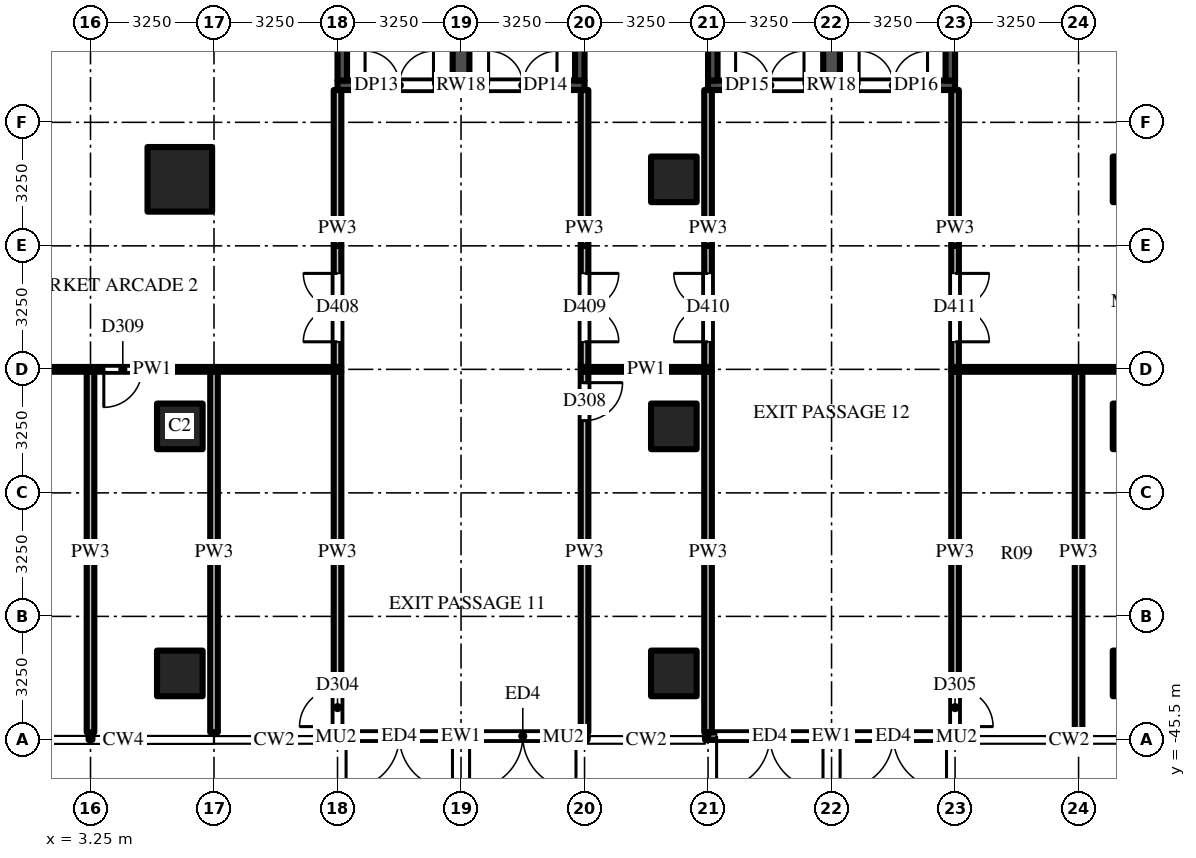
"""IFC4 building model, lengths in metres.
Left out: names, types, materials, properties, quantities, classifications, styles, units other than length and angle.
Written with IfcOpenShell. Run it as: python <this file> out.ifc"""

import sys

from ifc_helpers import new_model, si_unit, direction, frame, frame_2d, origin, origin_2d, place, context, subcontext, project, spatial, rectangle, extrude, source, transform, mapped, element, fill, save


model = new_model("IFC4")
c1 = context("Model", 3, precision=1e-05, world=origin(), true_north=direction((0.0, 1.0)))
c2 = subcontext(c1, "Body", "Model", "MODEL_VIEW")
j1 = project(units=[si_unit("LENGTHUNIT", "METRE"), si_unit("PLANEANGLEUNIT", "RADIAN")], contexts=[c1])
p1 = place(None, origin())
s1 = spatial("IfcSite", under=j1, at=p1, CompositionType="ELEMENT")
p2 = place(p1, origin())
s2 = spatial("IfcBuilding", under=s1, at=p2, CompositionType="ELEMENT")
p3 = place(p2, origin())
s3 = spatial("IfcBuildingStorey", under=s2, at=p3, CompositionType="ELEMENT", Elevation=0.0)
m1 = source(origin(), c2, "Body", "SweptSolid", [
    extrude(rectangle(XDim=1.7, YDim=1.7, at=origin_2d()), origin(), (0.0, 0.0, 1.0), 8.5),
])
p4 = place(p3, frame((5.6, -30.75, -0.5), z_axis=(0.0, 0.0, 1.0), x_axis=(1.0, 0.0, 0.0)))
e1 = element("IfcColumn", 1, at=p4, inside=s3, PredefinedType="COLUMN", context=c2, shape_type="MappedRepresentation", body=[
    mapped(m1, transform((0.0, 0.0, 0.0))),
])
m2 = source(origin(), c2, "Body", "SweptSolid", [
    extrude(rectangle(XDim=1.2, YDim=1.2, at=origin_2d()), origin(), (0.0, 0.0, 1.0), 8.5),
])
for number, where, z_axis, x_axis in (
    (2, (5.6, -37.25, -0.5), (0.0, 0.0, 1.0), (1.0, 0.0, 0.0)),
    (3, (5.6, -43.75, -0.5), (0.0, 0.0, 1.0), (1.0, 0.0, 0.0)),
    (4, (18.6, -30.75, -0.5), (0.0, 0.0, 1.0), (1.0, 0.0, 0.0)),
    (5, (18.6, -37.25, -0.5), (0.0, 0.0, 1.0), (1.0, 0.0, 0.0)),
    (6, (18.6, -43.75, -0.5), (0.0, 0.0, 1.0), (1.0, 0.0, 0.0)),
    (7, (30.75, -30.75, -0.5), (0.0, 0.0, 1.0), (1.0, 0.0, 0.0)),
    (8, (30.75, -37.25, -0.5), (0.0, 0.0, 1.0), (1.0, 0.0, 0.0)),
    (9, (30.75, -43.75, -0.5), (0.0, 0.0, 1.0), (1.0, 0.0, 0.0)),
):
    element("IfcColumn", number, at=place(p3, frame(where, z_axis=z_axis, x_axis=x_axis)), inside=s3, PredefinedType="COLUMN", context=c2, shape_type="MappedRepresentation", body=[
        mapped(m2, transform((0.0, 0.0, 0.0))),
    ])
m3 = source(origin(), c2, "Body", "SweptSolid", [
    extrude(rectangle(XDim=6.5, YDim=0.25, at=frame_2d((3.25, 0.0))), origin(), (0.0, 0.0, 1.0), 7.7),
])
p5 = place(p3, frame((9.75, -28.275, 0.0), z_axis=(0.0, 0.0, 1.0), x_axis=(1.0, 0.0, 0.0)))
e10 = element("IfcWall", 10, at=p5, inside=s3, PredefinedType="SHEAR", context=c2, shape_type="MappedRepresentation", body=[
    mapped(m3, transform((0.0, 0.0, 0.0))),
])
m4 = source(origin(), c2, "Body", "SweptSolid", [
    extrude(rectangle(XDim=1.8, YDim=2.1, at=frame_2d((0.9, 1.05))), frame((0.0, 0.135, 0.0), z_axis=(0.0, -1.0, 0.0), x_axis=(1.0, 0.0, 0.0)), (0.0, 0.0, 1.0), 0.27),
])
p6 = place(p5, frame((0.725, 0.0, 0.0)))
e11 = element("IfcOpeningElement", 11, at=p6, cuts=e10, PredefinedType="OPENING", context=c2, shape_type="MappedRepresentation", body=[
    mapped(m4, transform((0.0, 0.0, 0.0))),
])
p7 = place(p5, frame((3.975, 0.0, 0.0)))
e12 = element("IfcOpeningElement", 12, at=p7, cuts=e10, PredefinedType="OPENING", context=c2, shape_type="MappedRepresentation", body=[
    mapped(m4, transform((0.0, 0.0, 0.0))),
])
m5 = source(origin(), c2, "Body", "SweptSolid", [
    extrude(rectangle(XDim=8.3, YDim=0.25, at=frame_2d((4.15, 0.0))), origin(), (0.0, 0.0, 1.0), 7.7),
])
for number, where, z_axis, x_axis in (
    (13, (9.875, -28.15, 0.0), (0.0, 0.0, 1.0), (0.0, 1.0, 0.0)),
    (14, (16.125, -28.15, 0.0), (0.0, 0.0, 1.0), (0.0, 1.0, 0.0)),
):
    element("IfcWall", number, at=place(p3, frame(where, z_axis=z_axis, x_axis=x_axis)), inside=s3, PredefinedType="SHEAR", context=c2, shape_type="MappedRepresentation", body=[
        mapped(m5, transform((0.0, 0.0, 0.0))),
    ])
m6 = source(origin(), c2, "Body", "SweptSolid", [
    extrude(rectangle(XDim=8.3, YDim=0.44, at=frame_2d((4.15, 0.0))), origin(), (0.0, 0.0, 1.0), 7.7),
])
p8 = place(p3, frame((13.0, -28.15, 0.0), z_axis=(0.0, 0.0, 1.0), x_axis=(0.0, 1.0, 0.0)))
e15 = element("IfcWall", 15, at=p8, inside=s3, PredefinedType="SHEAR", context=c2, shape_type="MappedRepresentation", body=[
    mapped(m6, transform((0.0, 0.0, 0.0))),
])
p9 = place(p3, frame((19.5, -28.275, 0.0), z_axis=(0.0, 0.0, 1.0), x_axis=(1.0, 0.0, 0.0)))
e16 = element("IfcWall", 16, at=p9, inside=s3, PredefinedType="SHEAR", context=c2, shape_type="MappedRepresentation", body=[
    mapped(m3, transform((0.0, 0.0, 0.0))),
])
p10 = place(p9, frame((0.725, 0.0, 0.0)))
e17 = element("IfcOpeningElement", 17, at=p10, cuts=e16, PredefinedType="OPENING", context=c2, shape_type="MappedRepresentation", body=[
    mapped(m4, transform((0.0, 0.0, 0.0))),
])
p11 = place(p9, frame((3.975, 0.0, 0.0)))
e18 = element("IfcOpeningElement", 18, at=p11, cuts=e16, PredefinedType="OPENING", context=c2, shape_type="MappedRepresentation", body=[
    mapped(m4, transform((0.0, 0.0, 0.0))),
])
for number, where, z_axis, x_axis in (
    (19, (19.625, -28.15, 0.0), (0.0, 0.0, 1.0), (0.0, 1.0, 0.0)),
    (20, (25.875, -28.15, 0.0), (0.0, 0.0, 1.0), (0.0, 1.0, 0.0)),
):
    element("IfcWall", number, at=place(p3, frame(where, z_axis=z_axis, x_axis=x_axis)), inside=s3, PredefinedType="SHEAR", context=c2, shape_type="MappedRepresentation", body=[
        mapped(m5, transform((0.0, 0.0, 0.0))),
    ])
p12 = place(p3, frame((22.75, -28.15, 0.0), z_axis=(0.0, 0.0, 1.0), x_axis=(0.0, 1.0, 0.0)))
e21 = element("IfcWall", 21, at=p12, inside=s3, PredefinedType="SHEAR", context=c2, shape_type="MappedRepresentation", body=[
    mapped(m6, transform((0.0, 0.0, 0.0))),
])
m7 = source(origin(), c2, "Body", "SweptSolid", [
    extrude(rectangle(XDim=3.25, YDim=0.2, at=frame_2d((1.625, 0.0))), origin(), (0.0, 0.0, 1.0), 7.7),
])
p13 = place(p3, frame((13.0, -45.4, 0.0), z_axis=(0.0, 0.0, 1.0), x_axis=(-1.0, 0.0, 0.0)))
e22 = element("IfcWall", 22, at=p13, inside=s3, PredefinedType="SOLIDWALL", context=c2, shape_type="MappedRepresentation", body=[
    mapped(m7, transform((0.0, 0.0, 0.0))),
])
m8 = source(origin(), c2, "Body", "SweptSolid", [
    extrude(rectangle(XDim=2.8, YDim=2.4, at=frame_2d((1.4, 1.2))), frame((0.0, 0.11, 0.0), z_axis=(0.0, -1.0, 0.0), x_axis=(1.0, 0.0, 0.0)), (0.0, 0.0, 1.0), 0.22),
])
p14 = place(p13, frame((0.225, 0.0, 0.0)))
e23 = element("IfcOpeningElement", 23, at=p14, cuts=e22, PredefinedType="OPENING", context=c2, shape_type="MappedRepresentation", body=[
    mapped(m8, transform((0.0, 0.0, 0.0))),
])
p15 = place(p3, frame((16.25, -45.4, 0.0), z_axis=(0.0, 0.0, 1.0), x_axis=(-1.0, 0.0, 0.0)))
e24 = element("IfcWall", 24, at=p15, inside=s3, PredefinedType="SOLIDWALL", context=c2, shape_type="MappedRepresentation", body=[
    mapped(m7, transform((0.0, 0.0, 0.0))),
])
p16 = place(p15, frame((0.225, 0.0, 0.0)))
e25 = element("IfcOpeningElement", 25, at=p16, cuts=e24, PredefinedType="OPENING", context=c2, shape_type="MappedRepresentation", body=[
    mapped(m8, transform((0.0, 0.0, 0.0))),
])
p17 = place(p3, frame((22.75, -45.4, 0.0), z_axis=(0.0, 0.0, 1.0), x_axis=(-1.0, 0.0, 0.0)))
e26 = element("IfcWall", 26, at=p17, inside=s3, PredefinedType="SOLIDWALL", context=c2, shape_type="MappedRepresentation", body=[
    mapped(m7, transform((0.0, 0.0, 0.0))),
])
p18 = place(p17, frame((0.225, 0.0, 0.0)))
e27 = element("IfcOpeningElement", 27, at=p18, cuts=e26, PredefinedType="OPENING", context=c2, shape_type="MappedRepresentation", body=[
    mapped(m8, transform((0.0, 0.0, 0.0))),
])
p19 = place(p3, frame((26.0, -45.4, 0.0), z_axis=(0.0, 0.0, 1.0), x_axis=(-1.0, 0.0, 0.0)))
e28 = element("IfcWall", 28, at=p19, inside=s3, PredefinedType="SOLIDWALL", context=c2, shape_type="MappedRepresentation", body=[
    mapped(m7, transform((0.0, 0.0, 0.0))),
])
p20 = place(p19, frame((0.225, 0.0, 0.0)))
e29 = element("IfcOpeningElement", 29, at=p20, cuts=e28, PredefinedType="OPENING", context=c2, shape_type="MappedRepresentation", body=[
    mapped(m8, transform((0.0, 0.0, 0.0))),
])
m9 = source(origin(), c2, "Body", "SweptSolid", [
    extrude(rectangle(XDim=9.488, YDim=0.2, at=frame_2d((4.744, 0.0))), origin(), (0.0, 0.0, 1.0), 6.918),
])
p21 = place(p3, frame((3.25, -45.3, 0.0), z_axis=(0.0, 0.0, 1.0), x_axis=(0.0, 1.0, 0.0)))
e30 = element("IfcWall", 30, at=p21, inside=s3, PredefinedType="PARTITIONING", context=c2, shape_type="MappedRepresentation", body=[
    mapped(m9, transform((0.0, 0.0, 0.0))),
])
m10 = source(origin(), c2, "Body", "SweptSolid", [
    extrude(rectangle(XDim=9.488, YDim=0.2, at=frame_2d((4.744, 0.0))), origin(), (0.0, 0.0, 1.0), 6.762),
])
p22 = place(p3, frame((6.5, -45.3, 0.0), z_axis=(0.0, 0.0, 1.0), x_axis=(0.0, 1.0, 0.0)))
e31 = element("IfcWall", 31, at=p22, inside=s3, PredefinedType="PARTITIONING", context=c2, shape_type="MappedRepresentation", body=[
    mapped(m10, transform((0.0, 0.0, 0.0))),
])
m11 = source(origin(), c2, "Body", "SweptSolid", [
    extrude(rectangle(XDim=3.188, YDim=0.2, at=frame_2d((1.594, 0.0))), origin(), (0.0, 0.0, 1.0), 6.997),
])
p23 = place(p3, frame((9.75, -35.688, 0.0), z_axis=(0.0, 0.0, 1.0), x_axis=(0.0, 1.0, 0.0)))
e32 = element("IfcWall", 32, at=p23, inside=s3, PredefinedType="PARTITIONING", context=c2, shape_type="MappedRepresentation", body=[
    mapped(m11, transform((0.0, 0.0, 0.0))),
])
m12 = source(origin(), c2, "Body", "SweptSolid", [
    extrude(rectangle(XDim=1.8, YDim=2.1, at=frame_2d((0.9, 1.05))), frame((0.0, 0.11, 0.0), z_axis=(0.0, -1.0, 0.0), x_axis=(1.0, 0.0, 0.0)), (0.0, 0.0, 1.0), 0.22),
])
p24 = place(p23, frame((0.663, 0.0, 0.0)))
e33 = element("IfcOpeningElement", 33, at=p24, cuts=e32, PredefinedType="OPENING", context=c2, shape_type="MappedRepresentation", body=[
    mapped(m12, transform((0.0, 0.0, 0.0))),
])
p25 = place(p3, frame((9.75, -45.3, 0.0), z_axis=(0.0, 0.0, 1.0), x_axis=(0.0, 1.0, 0.0)))
e34 = element("IfcWall", 34, at=p25, inside=s3, PredefinedType="PARTITIONING", context=c2, shape_type="MappedRepresentation", body=[
    mapped(m10, transform((0.0, 0.0, 0.0))),
])
m13 = source(origin(), c2, "Body", "SweptSolid", [
    extrude(rectangle(XDim=1.0, YDim=2.1, at=frame_2d((0.5, 1.05))), frame((0.0, 0.11, 0.0), z_axis=(0.0, -1.0, 0.0), x_axis=(1.0, 0.0, 0.0)), (0.0, 0.0, 1.0), 0.22),
])
p26 = place(p25, frame((0.15, 0.0, 0.0)))
e35 = element("IfcOpeningElement", 35, at=p26, cuts=e34, PredefinedType="OPENING", context=c2, shape_type="MappedRepresentation", body=[
    mapped(m13, transform((0.0, 0.0, 0.0))),
])
m14 = source(origin(), c2, "Body", "SweptSolid", [
    extrude(rectangle(XDim=4.1, YDim=0.2, at=frame_2d((2.05, 0.0))), origin(), (0.0, 0.0, 1.0), 6.762),
])
p27 = place(p3, frame((9.75, -32.5, 0.0), z_axis=(0.0, 0.0, 1.0), x_axis=(0.0, 1.0, 0.0)))
e36 = element("IfcWall", 36, at=p27, inside=s3, PredefinedType="PARTITIONING", context=c2, shape_type="MappedRepresentation", body=[
    mapped(m14, transform((0.0, 0.0, 0.0))),
])
p28 = place(p3, frame((16.25, -32.5, 0.0), z_axis=(0.0, 0.0, 1.0), x_axis=(0.0, -1.0, 0.0)))
e37 = element("IfcWall", 37, at=p28, inside=s3, PredefinedType="PARTITIONING", context=c2, shape_type="MappedRepresentation", body=[
    mapped(m11, transform((0.0, 0.0, 0.0))),
])
p29 = place(p28, frame((0.725, 0.0, 0.0)))
e38 = element("IfcOpeningElement", 38, at=p29, cuts=e37, PredefinedType="OPENING", context=c2, shape_type="MappedRepresentation", body=[
    mapped(m12, transform((0.0, 0.0, 0.0))),
])
p30 = place(p3, frame((16.25, -35.812, 0.0), z_axis=(0.0, 0.0, 1.0), x_axis=(0.0, -1.0, 0.0)))
e39 = element("IfcWall", 39, at=p30, inside=s3, PredefinedType="PARTITIONING", context=c2, shape_type="MappedRepresentation", body=[
    mapped(m10, transform((0.0, 0.0, 0.0))),
])
p31 = place(p30, frame((0.288, 0.0, 0.0)))
e40 = element("IfcOpeningElement", 40, at=p31, cuts=e39, PredefinedType="OPENING", context=c2, shape_type="MappedRepresentation", body=[
    mapped(m13, transform((0.0, 0.0, 0.0))),
])
p32 = place(p3, frame((16.25, -32.5, 0.0), z_axis=(0.0, 0.0, 1.0), x_axis=(0.0, 1.0, 0.0)))
e41 = element("IfcWall", 41, at=p32, inside=s3, PredefinedType="PARTITIONING", context=c2, shape_type="MappedRepresentation", body=[
    mapped(m14, transform((0.0, 0.0, 0.0))),
])
p33 = place(p3, frame((19.5, -35.688, 0.0), z_axis=(0.0, 0.0, 1.0), x_axis=(0.0, 1.0, 0.0)))
e42 = element("IfcWall", 42, at=p33, inside=s3, PredefinedType="PARTITIONING", context=c2, shape_type="MappedRepresentation", body=[
    mapped(m11, transform((0.0, 0.0, 0.0))),
])
p34 = place(p33, frame((0.663, 0.0, 0.0)))
e43 = element("IfcOpeningElement", 43, at=p34, cuts=e42, PredefinedType="OPENING", context=c2, shape_type="MappedRepresentation", body=[
    mapped(m12, transform((0.0, 0.0, 0.0))),
])
m15 = source(origin(), c2, "Body", "SweptSolid", [
    extrude(rectangle(XDim=9.488, YDim=0.2, at=frame_2d((4.744, 0.0))), origin(), (0.0, 0.0, 1.0), 6.839),
])
p35 = place(p3, frame((19.5, -45.3, 0.0), z_axis=(0.0, 0.0, 1.0), x_axis=(0.0, 1.0, 0.0)))
e44 = element("IfcWall", 44, at=p35, inside=s3, PredefinedType="PARTITIONING", context=c2, shape_type="MappedRepresentation", body=[
    mapped(m15, transform((0.0, 0.0, 0.0))),
])
m16 = source(origin(), c2, "Body", "SweptSolid", [
    extrude(rectangle(XDim=4.1, YDim=0.2, at=frame_2d((2.05, 0.0))), origin(), (0.0, 0.0, 1.0), 6.839),
])
p36 = place(p3, frame((19.5, -32.5, 0.0), z_axis=(0.0, 0.0, 1.0), x_axis=(0.0, 1.0, 0.0)))
e45 = element("IfcWall", 45, at=p36, inside=s3, PredefinedType="PARTITIONING", context=c2, shape_type="MappedRepresentation", body=[
    mapped(m16, transform((0.0, 0.0, 0.0))),
])
p37 = place(p3, frame((26.0, -32.5, 0.0), z_axis=(0.0, 0.0, 1.0), x_axis=(0.0, -1.0, 0.0)))
e46 = element("IfcWall", 46, at=p37, inside=s3, PredefinedType="PARTITIONING", context=c2, shape_type="MappedRepresentation", body=[
    mapped(m11, transform((0.0, 0.0, 0.0))),
])
p38 = place(p37, frame((0.725, 0.0, 0.0)))
e47 = element("IfcOpeningElement", 47, at=p38, cuts=e46, PredefinedType="OPENING", context=c2, shape_type="MappedRepresentation", body=[
    mapped(m12, transform((0.0, 0.0, 0.0))),
])
p39 = place(p3, frame((26.0, -35.812, 0.0), z_axis=(0.0, 0.0, 1.0), x_axis=(0.0, -1.0, 0.0)))
e48 = element("IfcWall", 48, at=p39, inside=s3, PredefinedType="PARTITIONING", context=c2, shape_type="MappedRepresentation", body=[
    mapped(m15, transform((0.0, 0.0, 0.0))),
])
p40 = place(p39, frame((8.337, 0.0, 0.0)))
e49 = element("IfcOpeningElement", 49, at=p40, cuts=e48, PredefinedType="OPENING", context=c2, shape_type="MappedRepresentation", body=[
    mapped(m13, transform((0.0, 0.0, 0.0))),
])
p41 = place(p3, frame((26.0, -32.5, 0.0), z_axis=(0.0, 0.0, 1.0), x_axis=(0.0, 1.0, 0.0)))
e50 = element("IfcWall", 50, at=p41, inside=s3, PredefinedType="PARTITIONING", context=c2, shape_type="MappedRepresentation", body=[
    mapped(m16, transform((0.0, 0.0, 0.0))),
])
p42 = place(p3, frame((29.25, -45.3, 0.0), z_axis=(0.0, 0.0, 1.0), x_axis=(0.0, 1.0, 0.0)))
e51 = element("IfcWall", 51, at=p42, inside=s3, PredefinedType="PARTITIONING", context=c2, shape_type="MappedRepresentation", body=[
    mapped(m15, transform((0.0, 0.0, 0.0))),
])
p43 = place(p3, frame((9.85, -35.75, 0.0), z_axis=(0.0, 0.0, 1.0), x_axis=(-1.0, 0.0, 0.0)))
e52 = element("IfcWall", 52, at=p43, inside=s3, PredefinedType="PARTITIONING", context=c2, shape_type="SweptSolid", body=[
    extrude(rectangle(XDim=9.95, YDim=0.125, at=frame_2d((4.975, 0.0))), origin(), (0.0, 0.0, 1.0), 6.997),
])
m17 = source(origin(), c2, "Body", "SweptSolid", [
    extrude(rectangle(XDim=1.0, YDim=2.1, at=frame_2d((0.5, 1.05))), frame((0.0, 0.073, 0.0), z_axis=(0.0, -1.0, 0.0), x_axis=(1.0, 0.0, 0.0)), (0.0, 0.0, 1.0), 0.145),
])
p44 = place(p43, frame((5.25, 0.0, 0.0)))
e53 = element("IfcOpeningElement", 53, at=p44, cuts=e52, PredefinedType="OPENING", context=c2, shape_type="MappedRepresentation", body=[
    mapped(m17, transform((0.0, 0.0, 0.0))),
])
m18 = source(origin(), c2, "Body", "SweptSolid", [
    extrude(rectangle(XDim=3.45, YDim=0.125, at=frame_2d((1.725, 0.0))), origin(), (0.0, 0.0, 1.0), 6.997),
])
p45 = place(p3, frame((19.6, -35.75, 0.0), z_axis=(0.0, 0.0, 1.0), x_axis=(-1.0, 0.0, 0.0)))
e54 = element("IfcWall", 54, at=p45, inside=s3, PredefinedType="PARTITIONING", context=c2, shape_type="MappedRepresentation", body=[
    mapped(m18, transform((0.0, 0.0, 0.0))),
])
m19 = source(origin(), c2, "Body", "SweptSolid", [
    extrude(rectangle(XDim=9.85, YDim=0.125, at=frame_2d((4.925, 0.0))), origin(), (0.0, 0.0, 1.0), 6.997),
])
p46 = place(p3, frame((35.75, -35.75, 0.0), z_axis=(0.0, 0.0, 1.0), x_axis=(-1.0, 0.0, 0.0)))
e55 = element("IfcWall", 55, at=p46, inside=s3, PredefinedType="PARTITIONING", context=c2, shape_type="MappedRepresentation", body=[
    mapped(m19, transform((0.0, 0.0, 0.0))),
])
m20 = source(origin(), c2, "Body", "SweptSolid", [
    extrude(rectangle(XDim=1.2, YDim=2.1, at=frame_2d((0.6, 1.05))), frame((0.0, 0.073, 0.0), z_axis=(0.0, -1.0, 0.0), x_axis=(1.0, 0.0, 0.0)), (0.0, 0.0, 1.0), 0.145),
])
p47 = place(p46, frame((3.15, 0.0, 0.0)))
e56 = element("IfcOpeningElement", 56, at=p47, cuts=e55, PredefinedType="OPENING", context=c2, shape_type="MappedRepresentation", body=[
    mapped(m20, transform((0.0, 0.0, 0.0))),
])
m21 = source(origin(), c2, "Body", "SweptSolid", [
    extrude(rectangle(XDim=1.8, YDim=2.1, at=frame_2d((0.9, 1.05))), frame((0.0, 0.025, 0.0), z_axis=(0.0, -1.0, 0.0), x_axis=(1.0, 0.0, 0.0)), (0.0, 0.0, 1.0), 0.05),
])
p48 = place(p6, origin())
e57 = element("IfcDoor", 57, at=p48, inside=s3, OperationType="DOUBLE_DOOR_SINGLE_SWING", PredefinedType="DOOR", context=c2, shape_type="MappedRepresentation", body=[
    mapped(m21, transform((0.0, 0.0, 0.0))),
])
fill(e11, e57)
p49 = place(p7, origin())
e58 = element("IfcDoor", 58, at=p49, inside=s3, OperationType="DOUBLE_DOOR_SINGLE_SWING", PredefinedType="DOOR", context=c2, shape_type="MappedRepresentation", body=[
    mapped(m21, transform((0.0, 0.0, 0.0))),
])
fill(e12, e58)
p50 = place(p10, origin())
e59 = element("IfcDoor", 59, at=p50, inside=s3, OperationType="DOUBLE_DOOR_SINGLE_SWING", PredefinedType="DOOR", context=c2, shape_type="MappedRepresentation", body=[
    mapped(m21, transform((0.0, 0.0, 0.0))),
])
fill(e17, e59)
p51 = place(p11, origin())
e60 = element("IfcDoor", 60, at=p51, inside=s3, OperationType="DOUBLE_DOOR_SINGLE_SWING", PredefinedType="DOOR", context=c2, shape_type="MappedRepresentation", body=[
    mapped(m21, transform((0.0, 0.0, 0.0))),
])
fill(e18, e60)
m22 = source(origin(), c2, "Body", "SweptSolid", [
    extrude(rectangle(XDim=2.8, YDim=2.4, at=frame_2d((1.4, 1.2))), frame((0.0, 0.025, 0.0), z_axis=(0.0, -1.0, 0.0), x_axis=(1.0, 0.0, 0.0)), (0.0, 0.0, 1.0), 0.05),
])
p52 = place(p14, origin())
e61 = element("IfcDoor", 61, at=p52, inside=s3, OperationType="DOUBLE_DOOR_SINGLE_SWING", PredefinedType="DOOR", context=c2, shape_type="MappedRepresentation", body=[
    mapped(m22, transform((0.0, 0.0, 0.0))),
])
fill(e23, e61)
p53 = place(p16, origin())
e62 = element("IfcDoor", 62, at=p53, inside=s3, OperationType="DOUBLE_DOOR_SINGLE_SWING", PredefinedType="DOOR", context=c2, shape_type="MappedRepresentation", body=[
    mapped(m22, transform((0.0, 0.0, 0.0))),
])
fill(e25, e62)
p54 = place(p18, origin())
e63 = element("IfcDoor", 63, at=p54, inside=s3, OperationType="DOUBLE_DOOR_SINGLE_SWING", PredefinedType="DOOR", context=c2, shape_type="MappedRepresentation", body=[
    mapped(m22, transform((0.0, 0.0, 0.0))),
])
fill(e27, e63)
p55 = place(p20, origin())
e64 = element("IfcDoor", 64, at=p55, inside=s3, OperationType="DOUBLE_DOOR_SINGLE_SWING", PredefinedType="DOOR", context=c2, shape_type="MappedRepresentation", body=[
    mapped(m22, transform((0.0, 0.0, 0.0))),
])
fill(e29, e64)
m23 = source(origin(), c2, "Body", "SweptSolid", [
    extrude(rectangle(XDim=1.0, YDim=2.1, at=frame_2d((0.5, 1.05))), frame((0.0, 0.025, 0.0), z_axis=(0.0, -1.0, 0.0), x_axis=(1.0, 0.0, 0.0)), (0.0, 0.0, 1.0), 0.05),
])
p56 = place(p26, origin())
e65 = element("IfcDoor", 65, at=p56, inside=s3, OperationType="SINGLE_SWING_LEFT", PredefinedType="DOOR", context=c2, shape_type="MappedRepresentation", body=[
    mapped(m23, transform((0.0, 0.0, 0.0))),
])
fill(e35, e65)
p57 = place(p40, origin())
e66 = element("IfcDoor", 66, at=p57, inside=s3, OperationType="SINGLE_SWING_RIGHT", PredefinedType="DOOR", context=c2, shape_type="MappedRepresentation", body=[
    mapped(m23, transform((0.0, 0.0, 0.0))),
])
fill(e49, e66)
p58 = place(p31, origin())
e67 = element("IfcDoor", 67, at=p58, inside=s3, OperationType="SINGLE_SWING_LEFT", PredefinedType="DOOR", context=c2, shape_type="MappedRepresentation", body=[
    mapped(m23, transform((0.0, 0.0, 0.0))),
])
fill(e40, e67)
p59 = place(p44, origin())
e68 = element("IfcDoor", 68, at=p59, inside=s3, OperationType="SINGLE_SWING_RIGHT", PredefinedType="DOOR", context=c2, shape_type="MappedRepresentation", body=[
    mapped(m23, transform((0.0, 0.0, 0.0))),
])
fill(e53, e68)
p60 = place(p24, origin())
e69 = element("IfcDoor", 69, at=p60, inside=s3, OperationType="DOUBLE_DOOR_SINGLE_SWING", PredefinedType="DOOR", context=c2, shape_type="MappedRepresentation", body=[
    mapped(m21, transform((0.0, 0.0, 0.0))),
])
fill(e33, e69)
p61 = place(p29, origin())
e70 = element("IfcDoor", 70, at=p61, inside=s3, OperationType="DOUBLE_DOOR_SINGLE_SWING", PredefinedType="DOOR", context=c2, shape_type="MappedRepresentation", body=[
    mapped(m21, transform((0.0, 0.0, 0.0))),
])
fill(e38, e70)
p62 = place(p34, origin())
e71 = element("IfcDoor", 71, at=p62, inside=s3, OperationType="DOUBLE_DOOR_SINGLE_SWING", PredefinedType="DOOR", context=c2, shape_type="MappedRepresentation", body=[
    mapped(m21, transform((0.0, 0.0, 0.0))),
])
fill(e43, e71)
p63 = place(p38, origin())
e72 = element("IfcDoor", 72, at=p63, inside=s3, OperationType="DOUBLE_DOOR_SINGLE_SWING", PredefinedType="DOOR", context=c2, shape_type="MappedRepresentation", body=[
    mapped(m21, transform((0.0, 0.0, 0.0))),
])
fill(e47, e72)
save(model, sys.argv[1])
